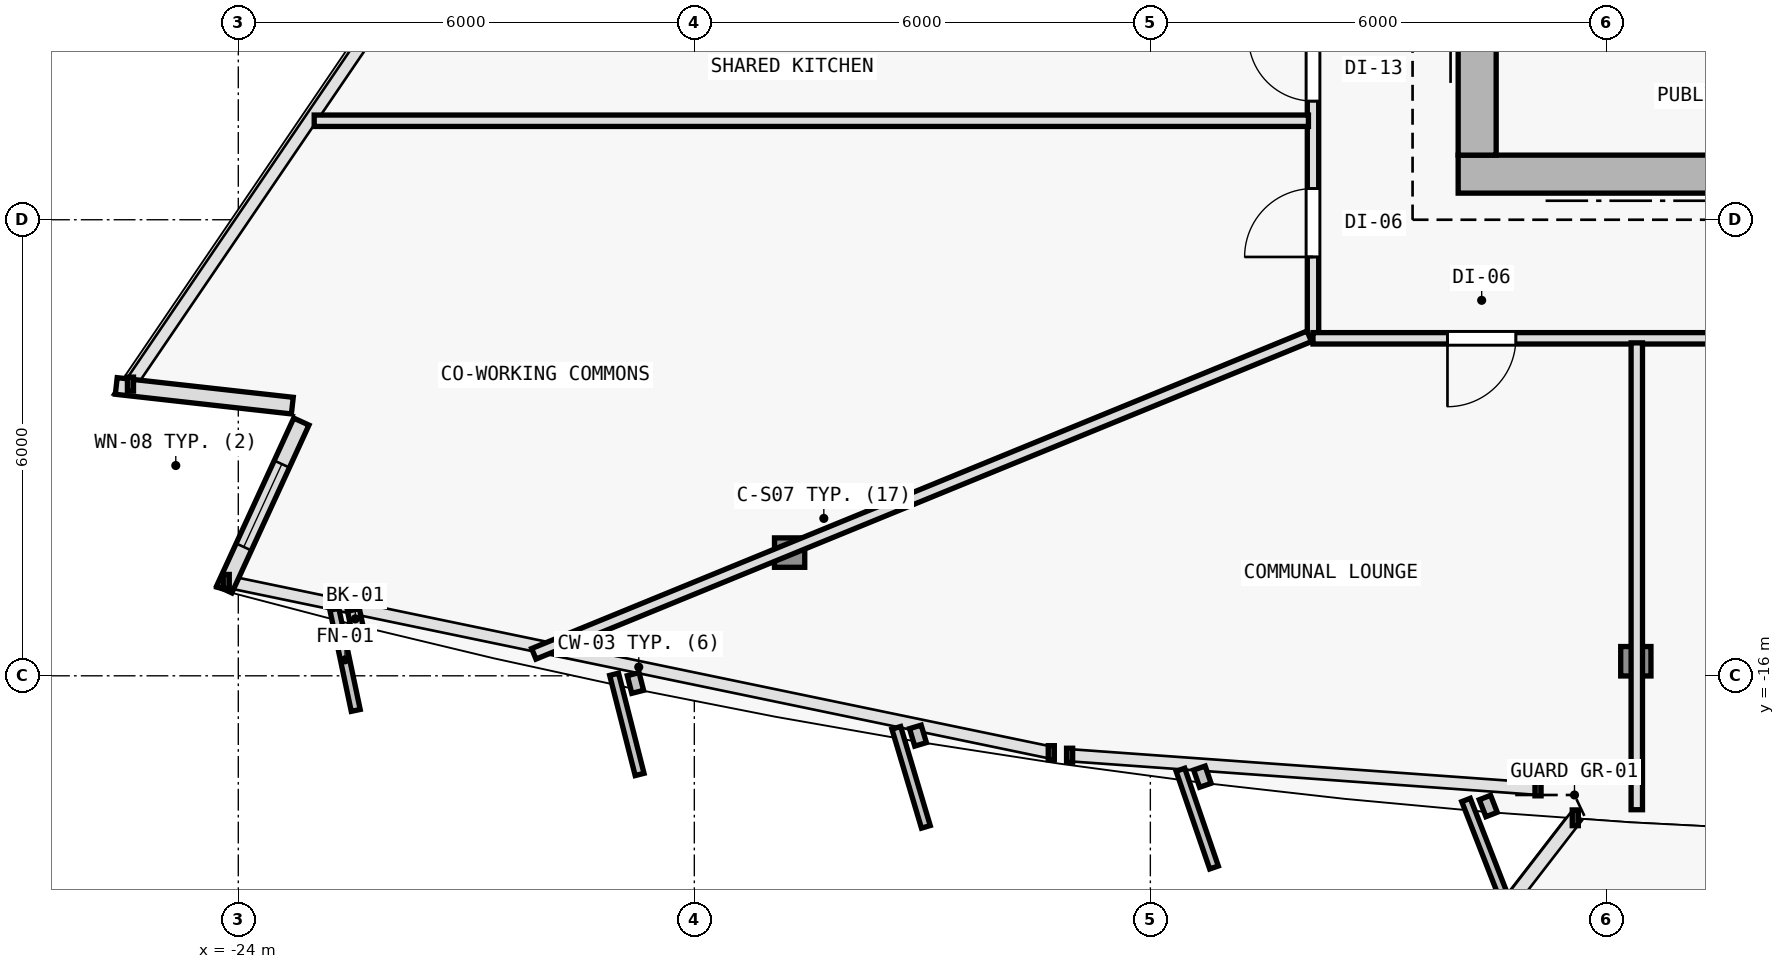
"""IFC4 building model, lengths in metres.
Left out: names, types, materials, properties, quantities, classifications, styles, units other than length and angle.
Written with IfcOpenShell. Run it as: python <this file> out.ifc"""

import sys

from ifc_helpers import new_model, si_unit, direction, frame, frame_2d, origin, origin_2d, place, context, subcontext, project, spatial, rectangle, i_section, extrude, element, fill, save


model = new_model("IFC4")
c1 = context("Model", 3, precision=1e-05, world=origin(), true_north=direction((0.0, 1.0)))
c2 = subcontext(c1, "Body", "Model", "MODEL_VIEW")
j1 = project(units=[si_unit("LENGTHUNIT", "METRE"), si_unit("PLANEANGLEUNIT", "RADIAN")], contexts=[c1])
p1 = place(None, origin())
s1 = spatial("IfcSite", under=j1, at=p1, CompositionType="ELEMENT")
p2 = place(p1, origin())
s2 = spatial("IfcBuilding", under=s1, at=p2, CompositionType="ELEMENT")
p3 = place(p2, frame((0.0, 0.0, 209.1)))
s3 = spatial("IfcBuildingStorey", under=s2, at=p3, CompositionType="ELEMENT", Elevation=209.1)
p4 = place(p3, frame((-7.7, -9.4, 0.0), z_axis=(0.0, 0.0, 1.0), x_axis=(1.0, 0.0, 0.0)))
e1 = element("IfcColumn", 1, at=p4, inside=s3, PredefinedType="COLUMN", context=c2, shape_type="SweptSolid", body=[
    extrude(i_section(OverallWidth=0.398, OverallDepth=0.387, WebThickness=0.013, FlangeThickness=0.022, FilletRadius=0.015, at=origin_2d()), origin(), (0.0, 0.0, 1.0), 3.6),
])
p5 = place(p3, frame((-16.746, -14.379, 0.005), z_axis=(0.021205666627, 0.034459208269, 0.999181106041), x_axis=(-0.851658316705, 0.524097425664, 0.0)))
e2 = element("IfcColumn", 2, at=p5, inside=s3, PredefinedType="COLUMN", context=c2, shape_type="SweptSolid", body=[
    extrude(i_section(OverallWidth=0.398, OverallDepth=0.387, WebThickness=0.013, FlangeThickness=0.022, FilletRadius=0.015, at=origin_2d()), origin(), (0.0, 0.0, 1.0), 3.592),
])
p6 = place(p3, frame((-5.613, -15.809, 0.005), z_axis=(0.007137482158, 0.036299194974, 0.999315478111), x_axis=(-0.981211567536, 0.192934858785, 0.0)))
e3 = element("IfcColumn", 3, at=p6, inside=s3, PredefinedType="COLUMN", context=c2, shape_type="SweptSolid", body=[
    extrude(i_section(OverallWidth=0.398, OverallDepth=0.387, WebThickness=0.013, FlangeThickness=0.022, FilletRadius=0.015, at=origin_2d()), origin(), (0.0, 0.0, 1.0), 3.592),
])
p7 = place(p3, frame((-23.289, -12.446, 0.0), z_axis=(0.0, 0.0, 1.0), x_axis=(-0.993829972675, 0.110914315635, 0.0)))
e4 = element("IfcWall", 4, at=p7, inside=s3, PredefinedType="SOLIDWALL", context=c2, shape_type="SweptSolid", body=[
    extrude(rectangle(XDim=2.331, YDim=0.22, at=frame_2d((1.166, 0.0))), origin(), (0.0, 0.0, 1.0), 3.35),
])
p8 = place(p3, frame((-24.185, -14.863, 0.0), z_axis=(0.0, 0.0, 1.0), x_axis=(0.417509141111, 0.90867272276, 0.0)))
e5 = element("IfcWall", 5, at=p8, inside=s3, PredefinedType="SOLIDWALL", context=c2, shape_type="SweptSolid", body=[
    extrude(rectangle(XDim=2.43, YDim=0.22, at=frame_2d((1.215, 0.0))), origin(), (0.0, 0.0, 1.0), 3.35),
])
p9 = place(p8, frame((0.615, 0.0, 0.62)))
e6 = element("IfcOpeningElement", 6, at=p9, cuts=e5, PredefinedType="OPENING", context=c2, shape_type="SweptSolid", body=[
    extrude(rectangle(XDim=1.2, YDim=1.8, at=frame_2d((0.6, 0.9))), frame((0.0, 0.12, 0.0), z_axis=(0.0, -1.0, 0.0), x_axis=(1.0, 0.0, 0.0)), (0.0, 0.0, 1.0), 0.24),
])
p10 = place(p3, frame((-7.95, -9.4, 0.0), z_axis=(0.0, 0.0, 1.0), x_axis=(1.0, 0.0, 0.0)))
e7 = element("IfcWall", 7, at=p10, inside=s3, PredefinedType="SHEAR", context=c2, shape_type="SweptSolid", body=[
    extrude(rectangle(XDim=15.9, YDim=0.5, at=frame_2d((7.95, 0.0))), origin(), (0.0, 0.0, 1.0), 3.35),
])
p11 = place(p10, frame((9.6, 0.0, 0.0)))
e8 = element("IfcOpeningElement", 8, at=p11, cuts=e7, PredefinedType="OPENING", context=c2, shape_type="SweptSolid", body=[
    extrude(rectangle(XDim=1.5, YDim=2.2, at=frame_2d((0.75, 1.1))), frame((0.0, 0.26, 0.0), z_axis=(0.0, -1.0, 0.0), x_axis=(1.0, 0.0, 0.0)), (0.0, 0.0, 1.0), 0.52),
])
p12 = place(p3, frame((-7.7, -9.15, 0.0), z_axis=(0.0, 0.0, 1.0), x_axis=(0.0, 1.0, 0.0)))
e9 = element("IfcWall", 9, at=p12, inside=s3, PredefinedType="SHEAR", context=c2, shape_type="SweptSolid", body=[
    extrude(rectangle(XDim=19.1, YDim=0.5, at=frame_2d((9.55, 0.0))), origin(), (0.0, 0.0, 1.0), 3.35),
])
p13 = place(p12, frame((12.7, 0.0, 0.0)))
e10 = element("IfcOpeningElement", 10, at=p13, cuts=e9, PredefinedType="OPENING", context=c2, shape_type="SweptSolid", body=[
    extrude(rectangle(XDim=1.1, YDim=2.15, at=frame_2d((0.55, 1.075))), frame((0.0, 0.26, 0.0), z_axis=(0.0, -1.0, 0.0), x_axis=(1.0, 0.0, 0.0)), (0.0, 0.0, 1.0), 0.52),
])
p14 = place(p3, frame((-9.86, -11.56, 0.0), z_axis=(0.0, 0.0, 1.0), x_axis=(0.0, 1.0, 0.0)))
e11 = element("IfcWall", 11, at=p14, inside=s3, PredefinedType="PARTITIONING", context=c2, shape_type="SweptSolid", body=[
    extrude(rectangle(XDim=19.986, YDim=0.15, at=frame_2d((9.993, 0.0))), origin(), (0.0, 0.0, 1.0), 2.825),
])
p15 = place(p14, frame((8.527, 0.0, 0.0)))
e12 = element("IfcOpeningElement", 12, at=p15, cuts=e11, PredefinedType="OPENING", context=c2, shape_type="SweptSolid", body=[
    extrude(rectangle(XDim=0.9, YDim=2.1, at=frame_2d((0.45, 1.05))), frame((0.0, 0.085, 0.0), z_axis=(0.0, -1.0, 0.0), x_axis=(1.0, 0.0, 0.0)), (0.0, 0.0, 1.0), 0.17),
])
p16 = place(p14, frame((4.449, 0.0, 0.0)))
e13 = element("IfcOpeningElement", 13, at=p16, cuts=e11, PredefinedType="OPENING", context=c2, shape_type="SweptSolid", body=[
    extrude(rectangle(XDim=0.85, YDim=2.1, at=frame_2d((0.425, 1.05))), frame((0.0, 0.085, 0.0), z_axis=(0.0, -1.0, 0.0), x_axis=(1.0, 0.0, 0.0)), (0.0, 0.0, 1.0), 0.17),
])
p17 = place(p14, frame((3.121, 0.0, 0.0)))
e14 = element("IfcOpeningElement", 14, at=p17, cuts=e11, PredefinedType="OPENING", context=c2, shape_type="SweptSolid", body=[
    extrude(rectangle(XDim=0.85, YDim=2.1, at=frame_2d((0.425, 1.05))), frame((0.0, 0.085, 0.0), z_axis=(0.0, -1.0, 0.0), x_axis=(1.0, 0.0, 0.0)), (0.0, 0.0, 1.0), 0.17),
])
p18 = place(p14, frame((1.07, 0.0, 0.0)))
e15 = element("IfcOpeningElement", 15, at=p18, cuts=e11, PredefinedType="OPENING", context=c2, shape_type="SweptSolid", body=[
    extrude(rectangle(XDim=0.9, YDim=2.1, at=frame_2d((0.45, 1.05))), frame((0.0, 0.085, 0.0), z_axis=(0.0, -1.0, 0.0), x_axis=(1.0, 0.0, 0.0)), (0.0, 0.0, 1.0), 0.17),
])
p19 = place(p14, frame((15.671, 0.0, 0.0)))
e16 = element("IfcOpeningElement", 16, at=p19, cuts=e11, PredefinedType="OPENING", context=c2, shape_type="SweptSolid", body=[
    extrude(rectangle(XDim=0.9, YDim=2.1, at=frame_2d((0.45, 1.05))), frame((0.0, 0.085, 0.0), z_axis=(0.0, -1.0, 0.0), x_axis=(1.0, 0.0, 0.0)), (0.0, 0.0, 1.0), 0.17),
])
p20 = place(p3, frame((13.18, -11.56, 0.0), z_axis=(0.0, 0.0, 1.0), x_axis=(-1.0, 0.0, 0.0)))
e17 = element("IfcWall", 17, at=p20, inside=s3, PredefinedType="PARTITIONING", context=c2, shape_type="SweptSolid", body=[
    extrude(rectangle(XDim=23.04, YDim=0.15, at=frame_2d((11.52, 0.0))), origin(), (0.0, 0.0, 1.0), 2.825),
])
p21 = place(p20, frame((20.371, 0.0, 0.0)))
e18 = element("IfcOpeningElement", 18, at=p21, cuts=e17, PredefinedType="OPENING", context=c2, shape_type="SweptSolid", body=[
    extrude(rectangle(XDim=0.9, YDim=2.1, at=frame_2d((0.45, 1.05))), frame((0.0, 0.085, 0.0), z_axis=(0.0, -1.0, 0.0), x_axis=(1.0, 0.0, 0.0)), (0.0, 0.0, 1.0), 0.17),
])
p22 = place(p20, frame((12.73, 0.0, 0.0)))
e19 = element("IfcOpeningElement", 19, at=p22, cuts=e17, PredefinedType="OPENING", context=c2, shape_type="SweptSolid", body=[
    extrude(rectangle(XDim=0.9, YDim=2.1, at=frame_2d((0.45, 1.05))), frame((0.0, 0.085, 0.0), z_axis=(0.0, -1.0, 0.0), x_axis=(1.0, 0.0, 0.0)), (0.0, 0.0, 1.0), 0.17),
])
p23 = place(p20, frame((3.429, 0.0, 0.0)))
e20 = element("IfcOpeningElement", 20, at=p23, cuts=e17, PredefinedType="OPENING", context=c2, shape_type="SweptSolid", body=[
    extrude(rectangle(XDim=0.9, YDim=2.1, at=frame_2d((0.45, 1.05))), frame((0.0, 0.085, 0.0), z_axis=(0.0, -1.0, 0.0), x_axis=(1.0, 0.0, 0.0)), (0.0, 0.0, 1.0), 0.17),
])
p24 = place(p3, frame((-9.909, -11.533, 0.0), z_axis=(0.0, 0.0, 1.0), x_axis=(-0.925437564654, -0.378900137144, 0.0)))
e21 = element("IfcWall", 21, at=p24, inside=s3, PredefinedType="PARTITIONING", context=c2, shape_type="SweptSolid", body=[
    extrude(rectangle(XDim=11.025, YDim=0.15, at=frame_2d((5.512, 0.0))), origin(), (0.0, 0.0, 1.0), 2.825),
])
p25 = place(p3, frame((-5.6, -11.62, 0.0), z_axis=(0.0, 0.0, 1.0), x_axis=(0.0, -1.0, 0.0)))
e22 = element("IfcWall", 22, at=p25, inside=s3, PredefinedType="PARTITIONING", context=c2, shape_type="SweptSolid", body=[
    extrude(rectangle(XDim=6.142, YDim=0.15, at=frame_2d((3.071, 0.0))), origin(), (0.0, 0.0, 1.0), 2.825),
])
p26 = place(p3, frame((-9.92, -8.698, 0.0), z_axis=(0.0, 0.0, 1.0), x_axis=(-1.0, 0.0, 0.0)))
e23 = element("IfcWall", 23, at=p26, inside=s3, PredefinedType="PARTITIONING", context=c2, shape_type="SweptSolid", body=[
    extrude(rectangle(XDim=13.081, YDim=0.15, at=frame_2d((6.541, 0.0))), origin(), (0.0, 0.0, 1.0), 2.825),
])
p27 = place(p9, origin())
e24 = element("IfcWindow", 24, at=p27, inside=s3, PartitioningType="SINGLE_PANEL", PredefinedType="WINDOW", context=c2, shape_type="SweptSolid", body=[
    extrude(rectangle(XDim=1.2, YDim=1.8, at=frame_2d((0.6, 0.9))), frame((0.0, 0.03, 0.0), z_axis=(0.0, -1.0, 0.0), x_axis=(1.0, 0.0, 0.0)), (0.0, 0.0, 1.0), 0.06),
])
fill(e6, e24)
p28 = place(p17, origin())
e25 = element("IfcDoor", 25, at=p28, inside=s3, OperationType="SINGLE_SWING_RIGHT", PredefinedType="DOOR", context=c2, shape_type="SweptSolid", body=[
    extrude(rectangle(XDim=0.85, YDim=2.1, at=frame_2d((0.425, 1.05))), frame((0.0, 0.025, 0.0), z_axis=(0.0, -1.0, 0.0), x_axis=(1.0, 0.0, 0.0)), (0.0, 0.0, 1.0), 0.05),
])
fill(e14, e25)
p29 = place(p18, origin())
e26 = element("IfcDoor", 26, at=p29, inside=s3, OperationType="SINGLE_SWING_LEFT", PredefinedType="DOOR", context=c2, shape_type="SweptSolid", body=[
    extrude(rectangle(XDim=0.9, YDim=2.1, at=frame_2d((0.45, 1.05))), frame((0.0, 0.025, 0.0), z_axis=(0.0, -1.0, 0.0), x_axis=(1.0, 0.0, 0.0)), (0.0, 0.0, 1.0), 0.05),
])
fill(e15, e26)
p30 = place(p21, origin())
e27 = element("IfcDoor", 27, at=p30, inside=s3, OperationType="SINGLE_SWING_RIGHT", PredefinedType="DOOR", context=c2, shape_type="SweptSolid", body=[
    extrude(rectangle(XDim=0.9, YDim=2.1, at=frame_2d((0.45, 1.05))), frame((0.0, 0.025, 0.0), z_axis=(0.0, -1.0, 0.0), x_axis=(1.0, 0.0, 0.0)), (0.0, 0.0, 1.0), 0.05),
])
fill(e18, e27)
save(model, sys.argv[1])
